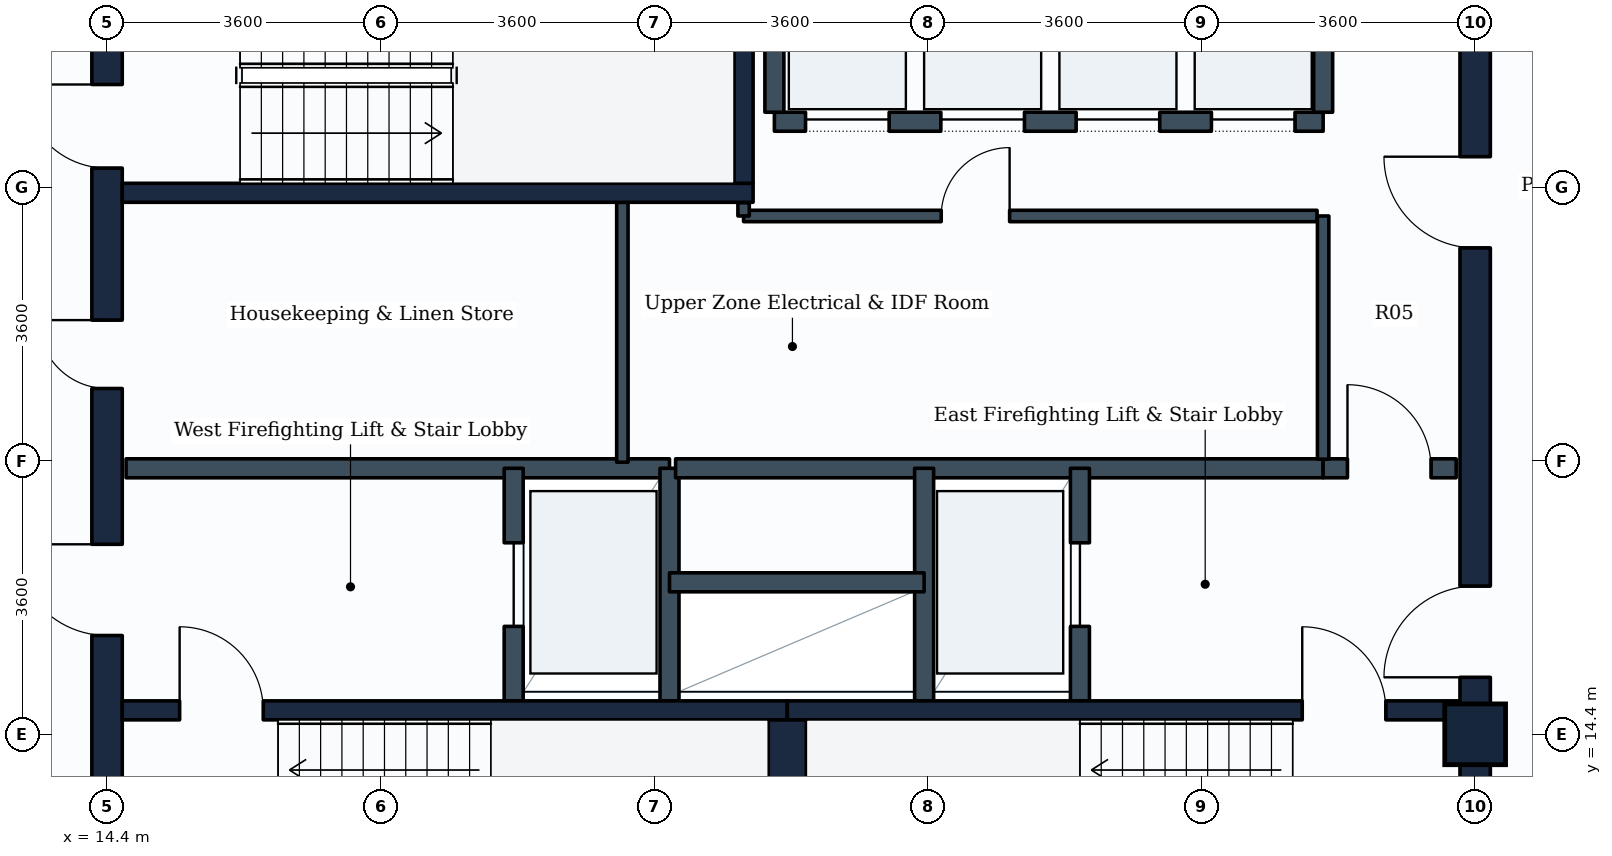
"""IFC4 building model, lengths in metres.
Left out: names, types, materials, properties, quantities, classifications, styles, units other than length and angle.
Written with IfcOpenShell. Run it as: python <this file> out.ifc"""

import sys

from ifc_helpers import new_model, si_unit, direction, frame, frame_2d, origin, origin_2d, place, context, subcontext, project, spatial, rectangle, extrude, element, fill, save


model = new_model("IFC4")
c1 = context("Model", 3, precision=1e-05, world=origin(), true_north=direction((0.0, 1.0)))
c2 = subcontext(c1, "Body", "Model", "MODEL_VIEW")
j1 = project(units=[si_unit("LENGTHUNIT", "METRE"), si_unit("PLANEANGLEUNIT", "RADIAN")], contexts=[c1])
p1 = place(None, origin())
s1 = spatial("IfcSite", under=j1, at=p1, CompositionType="ELEMENT")
p2 = place(p1, origin())
s2 = spatial("IfcBuilding", under=s1, at=p2, CompositionType="ELEMENT")
p3 = place(p2, frame((0.0, 0.0, 259.4)))
s3 = spatial("IfcBuildingStorey", under=s2, at=p3, CompositionType="ELEMENT", Elevation=259.4)
p4 = place(p3, frame((32.4, 14.4, 0.0), z_axis=(0.0, 0.0, 1.0), x_axis=(1.0, 0.0, 0.0)))
e1 = element("IfcColumn", 1, at=p4, inside=s3, PredefinedType="COLUMN", context=c2, shape_type="SweptSolid", body=[
    extrude(rectangle(XDim=0.8, YDim=0.8, at=origin_2d()), origin(), (0.0, 0.0, 1.0), 3.6),
])
p5 = place(p3, frame((14.4, 10.8, 0.0), z_axis=(0.0, 0.0, 1.0), x_axis=(0.0, 1.0, 0.0)))
e2 = element("IfcWall", 2, at=p5, inside=s3, PredefinedType="SHEAR", context=c2, shape_type="SweptSolid", body=[
    extrude(rectangle(XDim=14.4, YDim=0.4, at=frame_2d((7.2, 0.0))), origin(), (0.0, 0.0, 1.0), 3.35),
])
p6 = place(p5, frame((11.05, 0.0, 0.0)))
e3 = element("IfcOpeningElement", 3, at=p6, cuts=e2, PredefinedType="OPENING", context=c2, shape_type="SweptSolid", body=[
    extrude(rectangle(XDim=1.1, YDim=2.1, at=frame_2d((0.55, 1.05))), frame((0.0, 0.21, 0.0), z_axis=(0.0, -1.0, 0.0), x_axis=(1.0, 0.0, 0.0)), (0.0, 0.0, 1.0), 0.42),
])
p7 = place(p5, frame((4.9, 0.0, 0.0)))
e4 = element("IfcOpeningElement", 4, at=p7, cuts=e2, PredefinedType="OPENING", context=c2, shape_type="SweptSolid", body=[
    extrude(rectangle(XDim=1.2, YDim=2.1, at=frame_2d((0.6, 1.05))), frame((0.0, 0.21, 0.0), z_axis=(0.0, -1.0, 0.0), x_axis=(1.0, 0.0, 0.0)), (0.0, 0.0, 1.0), 0.42),
])
p8 = place(p5, frame((8.15, 0.0, 0.0)))
e5 = element("IfcOpeningElement", 5, at=p8, cuts=e2, PredefinedType="OPENING", context=c2, shape_type="SweptSolid", body=[
    extrude(rectangle(XDim=0.9, YDim=2.1, at=frame_2d((0.45, 1.05))), frame((0.0, 0.21, 0.0), z_axis=(0.0, -1.0, 0.0), x_axis=(1.0, 0.0, 0.0)), (0.0, 0.0, 1.0), 0.42),
])
p9 = place(p3, frame((32.4, 10.8, 0.0), z_axis=(0.0, 0.0, 1.0), x_axis=(0.0, 1.0, 0.0)))
e6 = element("IfcWall", 6, at=p9, inside=s3, PredefinedType="SHEAR", context=c2, shape_type="SweptSolid", body=[
    extrude(rectangle(XDim=14.4, YDim=0.4, at=frame_2d((7.2, 0.0))), origin(), (0.0, 0.0, 1.0), 3.35),
])
p10 = place(p9, frame((4.35, 0.0, 0.0)))
e7 = element("IfcOpeningElement", 7, at=p10, cuts=e6, PredefinedType="OPENING", context=c2, shape_type="SweptSolid", body=[
    extrude(rectangle(XDim=1.2, YDim=2.1, at=frame_2d((0.6, 1.05))), frame((0.0, 0.21, 0.0), z_axis=(0.0, -1.0, 0.0), x_axis=(1.0, 0.0, 0.0)), (0.0, 0.0, 1.0), 0.42),
])
p11 = place(p9, frame((10.0, 0.0, 0.0)))
e8 = element("IfcOpeningElement", 8, at=p11, cuts=e6, PredefinedType="OPENING", context=c2, shape_type="SweptSolid", body=[
    extrude(rectangle(XDim=1.2, YDim=2.1, at=frame_2d((0.6, 1.05))), frame((0.0, 0.21, 0.0), z_axis=(0.0, -1.0, 0.0), x_axis=(1.0, 0.0, 0.0)), (0.0, 0.0, 1.0), 0.42),
])
p12 = place(p3, frame((14.6, 14.715, 0.0), z_axis=(0.0, 0.0, 1.0), x_axis=(1.0, 0.0, 0.0)))
e9 = element("IfcWall", 9, at=p12, inside=s3, PredefinedType="SHEAR", context=c2, shape_type="SweptSolid", body=[
    extrude(rectangle(XDim=8.75, YDim=0.25, at=frame_2d((4.375, 0.0))), origin(), (0.0, 0.0, 1.0), 3.35),
])
p13 = place(p12, frame((0.755, 0.0, 0.0)))
e10 = element("IfcOpeningElement", 10, at=p13, cuts=e9, PredefinedType="OPENING", context=c2, shape_type="SweptSolid", body=[
    extrude(rectangle(XDim=1.1, YDim=2.1, at=frame_2d((0.55, 1.05))), frame((0.0, 0.135, 0.0), z_axis=(0.0, -1.0, 0.0), x_axis=(1.0, 0.0, 0.0)), (0.0, 0.0, 1.0), 0.27),
])
p14 = place(p3, frame((23.35, 14.715, 0.0), z_axis=(0.0, 0.0, 1.0), x_axis=(1.0, 0.0, 0.0)))
e11 = element("IfcWall", 11, at=p14, inside=s3, PredefinedType="SHEAR", context=c2, shape_type="SweptSolid", body=[
    extrude(rectangle(XDim=8.85, YDim=0.25, at=frame_2d((4.425, 0.0))), origin(), (0.0, 0.0, 1.0), 3.35),
])
p15 = place(p14, frame((6.775, 0.0, 0.0)))
e12 = element("IfcOpeningElement", 12, at=p15, cuts=e11, PredefinedType="OPENING", context=c2, shape_type="SweptSolid", body=[
    extrude(rectangle(XDim=1.1, YDim=2.1, at=frame_2d((0.55, 1.05))), frame((0.0, 0.135, 0.0), z_axis=(0.0, -1.0, 0.0), x_axis=(1.0, 0.0, 0.0)), (0.0, 0.0, 1.0), 0.27),
])
p16 = place(p3, frame((23.35, 11.75, 0.0), z_axis=(0.0, 0.0, 1.0), x_axis=(0.0, 1.0, 0.0)))
e13 = element("IfcWall", 13, at=p16, inside=s3, PredefinedType="SHEAR", context=c2, shape_type="SweptSolid", body=[
    extrude(rectangle(XDim=2.84, YDim=0.5, at=frame_2d((1.42, 0.0))), origin(), (0.0, 0.0, 1.0), 3.35),
])
p17 = place(p3, frame((14.6, 21.525, 0.0), z_axis=(0.0, 0.0, 1.0), x_axis=(1.0, 0.0, 0.0)))
e14 = element("IfcWall", 14, at=p17, inside=s3, PredefinedType="SHEAR", context=c2, shape_type="SweptSolid", body=[
    extrude(rectangle(XDim=8.3, YDim=0.25, at=frame_2d((4.15, 0.0))), origin(), (0.0, 0.0, 1.0), 3.35),
])
p18 = place(p3, frame((22.775, 21.65, 0.0), z_axis=(0.0, 0.0, 1.0), x_axis=(0.0, 1.0, 0.0)))
e15 = element("IfcWall", 15, at=p18, inside=s3, PredefinedType="SHEAR", context=c2, shape_type="SweptSolid", body=[
    extrude(rectangle(XDim=2.84, YDim=0.25, at=frame_2d((1.42, 0.0))), origin(), (0.0, 0.0, 1.0), 3.35),
])
p19 = place(p3, frame((14.65, 17.9, 0.0), z_axis=(0.0, 0.0, 1.0), x_axis=(1.0, 0.0, 0.0)))
e16 = element("IfcWall", 16, at=p19, inside=s3, PredefinedType="PARTITIONING", context=c2, shape_type="SweptSolid", body=[
    extrude(rectangle(XDim=7.15, YDim=0.25, at=frame_2d((3.575, 0.0))), origin(), (0.0, 0.0, 1.0), 3.335),
])
p20 = place(p3, frame((19.75, 14.84, 0.0), z_axis=(0.0, 0.0, 1.0), x_axis=(0.0, 1.0, 0.0)))
e17 = element("IfcWall", 17, at=p20, inside=s3, PredefinedType="PARTITIONING", context=c2, shape_type="SweptSolid", body=[
    extrude(rectangle(XDim=3.06, YDim=0.25, at=frame_2d((1.53, 0.0))), origin(), (0.0, 0.0, 1.0), 3.335),
])
p21 = place(p20, frame((0.98, 0.0, 0.0)))
e18 = element("IfcOpeningElement", 18, at=p21, cuts=e17, PredefinedType="OPENING", context=c2, shape_type="SweptSolid", body=[
    extrude(rectangle(XDim=1.1, YDim=2.1, at=frame_2d((0.55, 1.05))), frame((0.0, 0.135, 0.0), z_axis=(0.0, -1.0, 0.0), x_axis=(1.0, 0.0, 0.0)), (0.0, 0.0, 1.0), 0.27),
])
p22 = place(p3, frame((21.8, 14.84, 0.0), z_axis=(0.0, 0.0, 1.0), x_axis=(0.0, 1.0, 0.0)))
e19 = element("IfcWall", 19, at=p22, inside=s3, PredefinedType="PARTITIONING", context=c2, shape_type="SweptSolid", body=[
    extrude(rectangle(XDim=3.06, YDim=0.25, at=frame_2d((1.53, 0.0))), origin(), (0.0, 0.0, 1.0), 3.335),
])
p23 = place(p3, frame((21.88, 17.9, 0.0), z_axis=(0.0, 0.0, 1.0), x_axis=(1.0, 0.0, 0.0)))
e20 = element("IfcWall", 20, at=p23, inside=s3, PredefinedType="PARTITIONING", context=c2, shape_type="SweptSolid", body=[
    extrude(rectangle(XDim=8.52, YDim=0.25, at=frame_2d((4.26, 0.0))), origin(), (0.0, 0.0, 1.0), 3.335),
])
p24 = place(p3, frame((30.4, 17.9, 0.0), z_axis=(0.0, 0.0, 1.0), x_axis=(1.0, 0.0, 0.0)))
e21 = element("IfcWall", 21, at=p24, inside=s3, PredefinedType="PARTITIONING", context=c2, shape_type="SweptSolid", body=[
    extrude(rectangle(XDim=1.75, YDim=0.25, at=frame_2d((0.875, 0.0))), origin(), (0.0, 0.0, 1.0), 3.335),
])
p25 = place(p24, frame((0.32, 0.0, 0.0)))
e22 = element("IfcOpeningElement", 22, at=p25, cuts=e21, PredefinedType="OPENING", context=c2, shape_type="SweptSolid", body=[
    extrude(rectangle(XDim=1.1, YDim=2.1, at=frame_2d((0.55, 1.05))), frame((0.0, 0.135, 0.0), z_axis=(0.0, -1.0, 0.0), x_axis=(1.0, 0.0, 0.0)), (0.0, 0.0, 1.0), 0.27),
])
p26 = place(p3, frame((25.15, 14.84, 0.0), z_axis=(0.0, 0.0, 1.0), x_axis=(0.0, 1.0, 0.0)))
e23 = element("IfcWall", 23, at=p26, inside=s3, PredefinedType="PARTITIONING", context=c2, shape_type="SweptSolid", body=[
    extrude(rectangle(XDim=3.06, YDim=0.25, at=frame_2d((1.53, 0.0))), origin(), (0.0, 0.0, 1.0), 3.335),
])
p27 = place(p3, frame((27.2, 14.84, 0.0), z_axis=(0.0, 0.0, 1.0), x_axis=(0.0, 1.0, 0.0)))
e24 = element("IfcWall", 24, at=p27, inside=s3, PredefinedType="PARTITIONING", context=c2, shape_type="SweptSolid", body=[
    extrude(rectangle(XDim=3.06, YDim=0.25, at=frame_2d((1.53, 0.0))), origin(), (0.0, 0.0, 1.0), 3.335),
])
p28 = place(p27, frame((0.98, 0.0, 0.0)))
e25 = element("IfcOpeningElement", 25, at=p28, cuts=e24, PredefinedType="OPENING", context=c2, shape_type="SweptSolid", body=[
    extrude(rectangle(XDim=1.1, YDim=2.1, at=frame_2d((0.55, 1.05))), frame((0.0, 0.135, 0.0), z_axis=(0.0, -1.0, 0.0), x_axis=(1.0, 0.0, 0.0)), (0.0, 0.0, 1.0), 0.27),
])
p29 = place(p3, frame((21.8, 16.4, 0.0), z_axis=(0.0, 0.0, 1.0), x_axis=(1.0, 0.0, 0.0)))
e26 = element("IfcWall", 26, at=p29, inside=s3, PredefinedType="PARTITIONING", context=c2, shape_type="SweptSolid", body=[
    extrude(rectangle(XDim=3.35, YDim=0.25, at=frame_2d((1.675, 0.0))), origin(), (0.0, 0.0, 1.0), 3.335),
])
p30 = place(p3, frame((23.18, 22.46, 0.0), z_axis=(0.0, 0.0, 1.0), x_axis=(1.0, 0.0, 0.0)))
e27 = element("IfcWall", 27, at=p30, inside=s3, PredefinedType="PARTITIONING", context=c2, shape_type="SweptSolid", body=[
    extrude(rectangle(XDim=7.22, YDim=0.25, at=frame_2d((3.61, 0.0))), origin(), (0.0, 0.0, 1.0), 3.335),
])
p31 = place(p30, frame((0.41, 0.0, 0.0)))
e28 = element("IfcOpeningElement", 28, at=p31, cuts=e27, PredefinedType="OPENING", context=c2, shape_type="SweptSolid", body=[
    extrude(rectangle(XDim=1.1, YDim=2.1, at=frame_2d((0.55, 1.05))), frame((0.0, 0.135, 0.0), z_axis=(0.0, -1.0, 0.0), x_axis=(1.0, 0.0, 0.0)), (0.0, 0.0, 1.0), 0.27),
])
p32 = place(p30, frame((2.19, 0.0, 0.0)))
e29 = element("IfcOpeningElement", 29, at=p32, cuts=e27, PredefinedType="OPENING", context=c2, shape_type="SweptSolid", body=[
    extrude(rectangle(XDim=1.1, YDim=2.1, at=frame_2d((0.55, 1.05))), frame((0.0, 0.135, 0.0), z_axis=(0.0, -1.0, 0.0), x_axis=(1.0, 0.0, 0.0)), (0.0, 0.0, 1.0), 0.27),
])
p33 = place(p30, frame((3.97, 0.0, 0.0)))
e30 = element("IfcOpeningElement", 30, at=p33, cuts=e27, PredefinedType="OPENING", context=c2, shape_type="SweptSolid", body=[
    extrude(rectangle(XDim=1.1, YDim=2.1, at=frame_2d((0.55, 1.05))), frame((0.0, 0.135, 0.0), z_axis=(0.0, -1.0, 0.0), x_axis=(1.0, 0.0, 0.0)), (0.0, 0.0, 1.0), 0.27),
])
p34 = place(p30, frame((5.75, 0.0, 0.0)))
e31 = element("IfcOpeningElement", 31, at=p34, cuts=e27, PredefinedType="OPENING", context=c2, shape_type="SweptSolid", body=[
    extrude(rectangle(XDim=1.1, YDim=2.1, at=frame_2d((0.55, 1.05))), frame((0.0, 0.135, 0.0), z_axis=(0.0, -1.0, 0.0), x_axis=(1.0, 0.0, 0.0)), (0.0, 0.0, 1.0), 0.27),
])
for number, where, z_axis, x_axis in (
    (32, (23.18, 22.585, 0.0), (0.0, 0.0, 1.0), (0.0, 1.0, 0.0)),
    (33, (30.4, 22.585, 0.0), (0.0, 0.0, 1.0), (0.0, 1.0, 0.0)),
):
    element("IfcWall", number, at=place(p3, frame(where, z_axis=z_axis, x_axis=x_axis)), inside=s3, PredefinedType="PARTITIONING", context=c2, shape_type="SweptSolid", body=[
        extrude(rectangle(XDim=2.315, YDim=0.25, at=frame_2d((1.157, 0.0))), origin(), (0.0, 0.0, 1.0), 3.335),
    ])
p35 = place(p3, frame((22.775, 21.22, 0.0), z_axis=(0.0, 0.0, 1.0), x_axis=(1.0, 0.0, 0.0)))
e34 = element("IfcWall", 34, at=p35, inside=s3, PredefinedType="PARTITIONING", context=c2, shape_type="SweptSolid", body=[
    extrude(rectangle(XDim=7.545, YDim=0.15, at=frame_2d((3.772, 0.0))), origin(), (0.0, 0.0, 1.0), 3.335),
])
p36 = place(p35, frame((2.6, 0.0, 0.0)))
e35 = element("IfcOpeningElement", 35, at=p36, cuts=e34, PredefinedType="OPENING", context=c2, shape_type="SweptSolid", body=[
    extrude(rectangle(XDim=0.9, YDim=2.1, at=frame_2d((0.45, 1.05))), frame((0.0, 0.085, 0.0), z_axis=(0.0, -1.0, 0.0), x_axis=(1.0, 0.0, 0.0)), (0.0, 0.0, 1.0), 0.17),
])
p37 = place(p3, frame((22.775, 21.22, 0.0), z_axis=(0.0, 0.0, 1.0), x_axis=(0.0, 1.0, 0.0)))
e36 = element("IfcWall", 36, at=p37, inside=s3, PredefinedType="PARTITIONING", context=c2, shape_type="SweptSolid", body=[
    extrude(rectangle(XDim=0.175, YDim=0.15, at=frame_2d((0.087, 0.0))), origin(), (0.0, 0.0, 1.0), 3.335),
])
p38 = place(p3, frame((30.4, 18.02, 0.0), z_axis=(0.0, 0.0, 1.0), x_axis=(0.0, 1.0, 0.0)))
e37 = element("IfcWall", 37, at=p38, inside=s3, PredefinedType="PARTITIONING", context=c2, shape_type="SweptSolid", body=[
    extrude(rectangle(XDim=3.2, YDim=0.15, at=frame_2d((1.6, 0.0))), origin(), (0.0, 0.0, 1.0), 3.335),
])
p39 = place(p3, frame((21.18, 17.98, 0.0), z_axis=(0.0, 0.0, 1.0), x_axis=(0.0, 1.0, 0.0)))
e38 = element("IfcWall", 38, at=p39, inside=s3, PredefinedType="PARTITIONING", context=c2, shape_type="SweptSolid", body=[
    extrude(rectangle(XDim=3.42, YDim=0.15, at=frame_2d((1.71, 0.0))), origin(), (0.0, 0.0, 1.0), 3.335),
])
p40 = place(p13, origin())
e39 = element("IfcDoor", 39, at=p40, inside=s3, OperationType="SINGLE_SWING_LEFT", PredefinedType="DOOR", context=c2, shape_type="SweptSolid", body=[
    extrude(rectangle(XDim=1.1, YDim=2.1, at=frame_2d((0.55, 1.05))), frame((0.0, 0.025, 0.0), z_axis=(0.0, -1.0, 0.0), x_axis=(1.0, 0.0, 0.0)), (0.0, 0.0, 1.0), 0.05),
])
fill(e10, e39)
p41 = place(p15, origin())
e40 = element("IfcDoor", 40, at=p41, inside=s3, OperationType="SINGLE_SWING_LEFT", PredefinedType="DOOR", context=c2, shape_type="SweptSolid", body=[
    extrude(rectangle(XDim=1.1, YDim=2.1, at=frame_2d((0.55, 1.05))), frame((0.0, 0.025, 0.0), z_axis=(0.0, -1.0, 0.0), x_axis=(1.0, 0.0, 0.0)), (0.0, 0.0, 1.0), 0.05),
])
fill(e12, e40)
p42 = place(p6, origin())
e41 = element("IfcDoor", 41, at=p42, inside=s3, OperationType="SINGLE_SWING_RIGHT", PredefinedType="DOOR", context=c2, shape_type="SweptSolid", body=[
    extrude(rectangle(XDim=1.1, YDim=2.1, at=frame_2d((0.55, 1.05))), frame((0.0, 0.025, 0.0), z_axis=(0.0, -1.0, 0.0), x_axis=(1.0, 0.0, 0.0)), (0.0, 0.0, 1.0), 0.05),
])
fill(e3, e41)
p43 = place(p21, origin())
e42 = element("IfcDoor", 42, at=p43, inside=s3, OperationType="SLIDING_TO_LEFT", PredefinedType="DOOR", context=c2, shape_type="SweptSolid", body=[
    extrude(rectangle(XDim=1.1, YDim=2.1, at=frame_2d((0.55, 1.05))), frame((0.0, 0.025, 0.0), z_axis=(0.0, -1.0, 0.0), x_axis=(1.0, 0.0, 0.0)), (0.0, 0.0, 1.0), 0.05),
])
fill(e18, e42)
p44 = place(p28, origin())
e43 = element("IfcDoor", 43, at=p44, inside=s3, OperationType="SLIDING_TO_LEFT", PredefinedType="DOOR", context=c2, shape_type="SweptSolid", body=[
    extrude(rectangle(XDim=1.1, YDim=2.1, at=frame_2d((0.55, 1.05))), frame((0.0, 0.025, 0.0), z_axis=(0.0, -1.0, 0.0), x_axis=(1.0, 0.0, 0.0)), (0.0, 0.0, 1.0), 0.05),
])
fill(e25, e43)
p45 = place(p7, origin())
e44 = element("IfcDoor", 44, at=p45, inside=s3, OperationType="SINGLE_SWING_RIGHT", PredefinedType="DOOR", context=c2, shape_type="SweptSolid", body=[
    extrude(rectangle(XDim=1.2, YDim=2.1, at=frame_2d((0.6, 1.05))), frame((0.0, 0.025, 0.0), z_axis=(0.0, -1.0, 0.0), x_axis=(1.0, 0.0, 0.0)), (0.0, 0.0, 1.0), 0.05),
])
fill(e4, e44)
p46 = place(p10, origin())
e45 = element("IfcDoor", 45, at=p46, inside=s3, OperationType="SINGLE_SWING_LEFT", PredefinedType="DOOR", context=c2, shape_type="SweptSolid", body=[
    extrude(rectangle(XDim=1.2, YDim=2.1, at=frame_2d((0.6, 1.05))), frame((0.0, 0.025, 0.0), z_axis=(0.0, -1.0, 0.0), x_axis=(1.0, 0.0, 0.0)), (0.0, 0.0, 1.0), 0.05),
])
fill(e7, e45)
p47 = place(p25, origin())
e46 = element("IfcDoor", 46, at=p47, inside=s3, OperationType="SINGLE_SWING_LEFT", PredefinedType="DOOR", context=c2, shape_type="SweptSolid", body=[
    extrude(rectangle(XDim=1.1, YDim=2.1, at=frame_2d((0.55, 1.05))), frame((0.0, 0.025, 0.0), z_axis=(0.0, -1.0, 0.0), x_axis=(1.0, 0.0, 0.0)), (0.0, 0.0, 1.0), 0.05),
])
fill(e22, e46)
p48 = place(p31, origin())
e47 = element("IfcDoor", 47, at=p48, inside=s3, OperationType="SLIDING_TO_LEFT", PredefinedType="DOOR", context=c2, shape_type="SweptSolid", body=[
    extrude(rectangle(XDim=1.1, YDim=2.1, at=frame_2d((0.55, 1.05))), frame((0.0, 0.025, 0.0), z_axis=(0.0, -1.0, 0.0), x_axis=(1.0, 0.0, 0.0)), (0.0, 0.0, 1.0), 0.05),
])
fill(e28, e47)
p49 = place(p32, origin())
e48 = element("IfcDoor", 48, at=p49, inside=s3, OperationType="SLIDING_TO_LEFT", PredefinedType="DOOR", context=c2, shape_type="SweptSolid", body=[
    extrude(rectangle(XDim=1.1, YDim=2.1, at=frame_2d((0.55, 1.05))), frame((0.0, 0.025, 0.0), z_axis=(0.0, -1.0, 0.0), x_axis=(1.0, 0.0, 0.0)), (0.0, 0.0, 1.0), 0.05),
])
fill(e29, e48)
p50 = place(p33, origin())
e49 = element("IfcDoor", 49, at=p50, inside=s3, OperationType="SLIDING_TO_LEFT", PredefinedType="DOOR", context=c2, shape_type="SweptSolid", body=[
    extrude(rectangle(XDim=1.1, YDim=2.1, at=frame_2d((0.55, 1.05))), frame((0.0, 0.025, 0.0), z_axis=(0.0, -1.0, 0.0), x_axis=(1.0, 0.0, 0.0)), (0.0, 0.0, 1.0), 0.05),
])
fill(e30, e49)
p51 = place(p34, origin())
e50 = element("IfcDoor", 50, at=p51, inside=s3, OperationType="SLIDING_TO_LEFT", PredefinedType="DOOR", context=c2, shape_type="SweptSolid", body=[
    extrude(rectangle(XDim=1.1, YDim=2.1, at=frame_2d((0.55, 1.05))), frame((0.0, 0.025, 0.0), z_axis=(0.0, -1.0, 0.0), x_axis=(1.0, 0.0, 0.0)), (0.0, 0.0, 1.0), 0.05),
])
fill(e31, e50)
p52 = place(p11, origin())
e51 = element("IfcDoor", 51, at=p52, inside=s3, OperationType="SINGLE_SWING_RIGHT", PredefinedType="DOOR", context=c2, shape_type="SweptSolid", body=[
    extrude(rectangle(XDim=1.2, YDim=2.1, at=frame_2d((0.6, 1.05))), frame((0.0, 0.025, 0.0), z_axis=(0.0, -1.0, 0.0), x_axis=(1.0, 0.0, 0.0)), (0.0, 0.0, 1.0), 0.05),
])
fill(e8, e51)
p53 = place(p8, origin())
e52 = element("IfcDoor", 52, at=p53, inside=s3, OperationType="SINGLE_SWING_RIGHT", PredefinedType="DOOR", context=c2, shape_type="SweptSolid", body=[
    extrude(rectangle(XDim=0.9, YDim=2.1, at=frame_2d((0.45, 1.05))), frame((0.0, 0.025, 0.0), z_axis=(0.0, -1.0, 0.0), x_axis=(1.0, 0.0, 0.0)), (0.0, 0.0, 1.0), 0.05),
])
fill(e5, e52)
p54 = place(p36, origin())
e53 = element("IfcDoor", 53, at=p54, inside=s3, OperationType="SINGLE_SWING_RIGHT", PredefinedType="DOOR", context=c2, shape_type="SweptSolid", body=[
    extrude(rectangle(XDim=0.9, YDim=2.1, at=frame_2d((0.45, 1.05))), frame((0.0, 0.025, 0.0), z_axis=(0.0, -1.0, 0.0), x_axis=(1.0, 0.0, 0.0)), (0.0, 0.0, 1.0), 0.05),
])
fill(e35, e53)
save(model, sys.argv[1])
